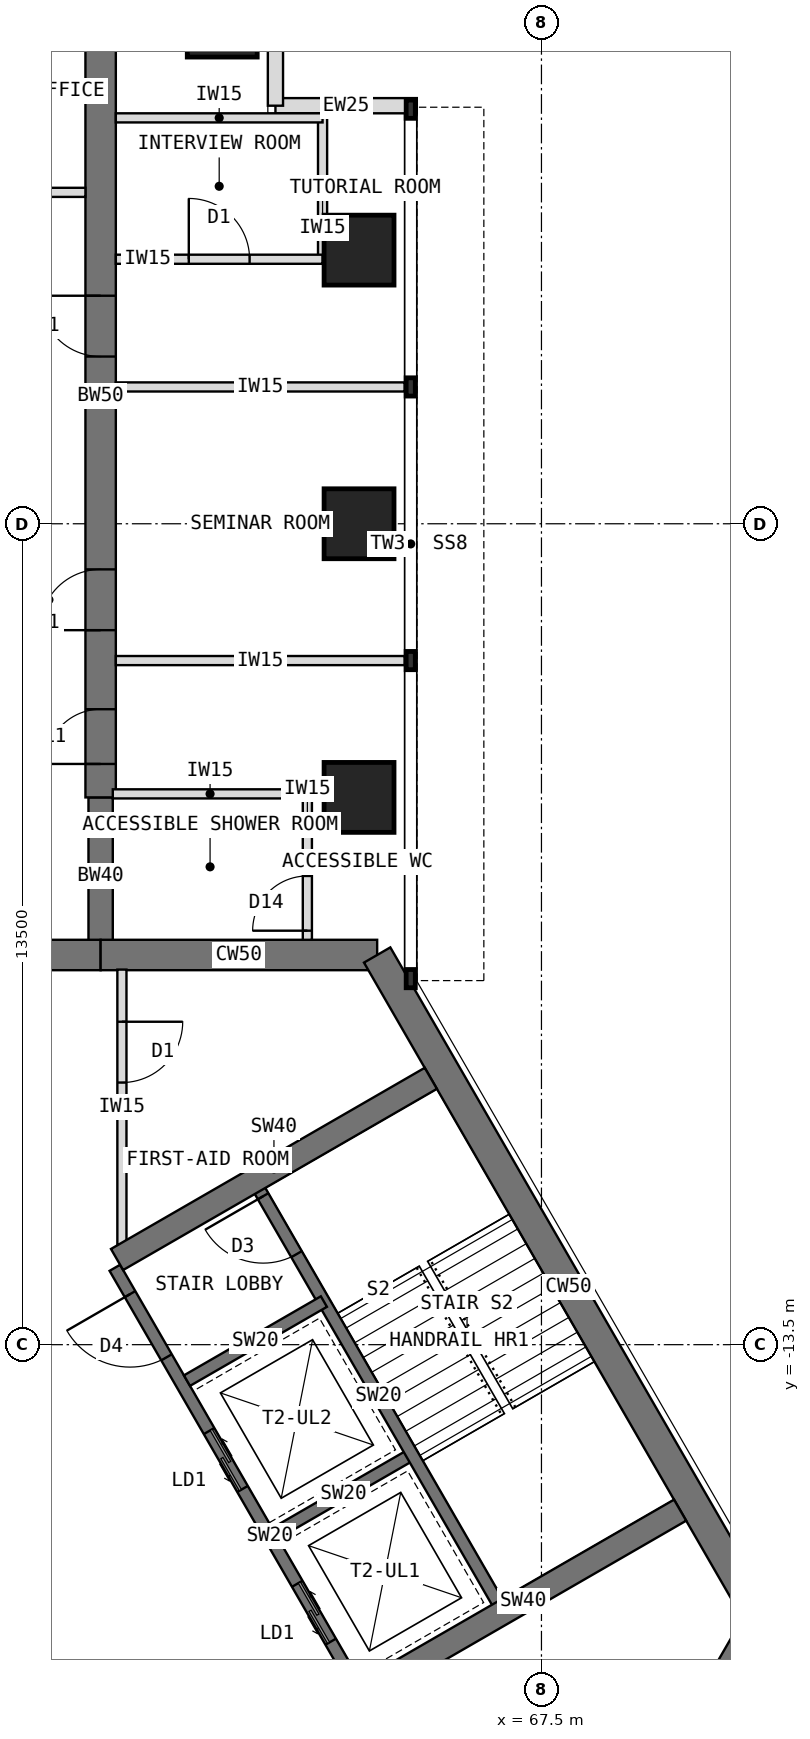
"""IFC4 building model, lengths in metres.
Left out: names, types, materials, properties, quantities, classifications, styles, units other than length and angle.
Written with IfcOpenShell. Run it as: python <this file> out.ifc"""

import sys

from ifc_helpers import new_model, si_unit, direction, frame, frame_2d, origin, origin_2d, place, context, subcontext, project, spatial, rectangle, extrude, element, fill, save


model = new_model("IFC4")
c1 = context("Model", 3, precision=1e-05, world=origin(), true_north=direction((0.0, 1.0)))
c2 = subcontext(c1, "Body", "Model", "MODEL_VIEW")
j1 = project(units=[si_unit("LENGTHUNIT", "METRE"), si_unit("PLANEANGLEUNIT", "RADIAN")], contexts=[c1])
p1 = place(None, origin())
s1 = spatial("IfcSite", under=j1, at=p1, CompositionType="ELEMENT")
p2 = place(p1, origin())
s2 = spatial("IfcBuilding", under=s1, at=p2, CompositionType="ELEMENT")
p3 = place(p2, frame((0.0, 0.0, 206.5)))
s3 = spatial("IfcBuildingStorey", under=s2, at=p3, CompositionType="ELEMENT", Elevation=206.5)
p4 = place(p3, frame((64.798, -7.092, 0.0), z_axis=(0.0, 0.0, 1.0), x_axis=(-1.0, 0.0, 0.0)))
e1 = element("IfcWall", 1, at=p4, inside=s3, PredefinedType="SHEAR", context=c2, shape_type="SweptSolid", body=[
    extrude(rectangle(XDim=4.548, YDim=0.5, at=frame_2d((2.274, 0.0))), origin(), (0.0, 0.0, 1.0), 4.0),
])
p5 = place(p3, frame((60.25, -7.092, 0.0), z_axis=(0.0, 0.0, 1.0), x_axis=(-1.0, 0.0, 0.0)))
e2 = element("IfcWall", 2, at=p5, inside=s3, PredefinedType="SHEAR", context=c2, shape_type="SweptSolid", body=[
    extrude(rectangle(XDim=3.5, YDim=0.5, at=frame_2d((1.75, 0.0))), origin(), (0.0, 0.0, 1.0), 4.0),
])
p6 = place(p5, frame((0.85, 0.0, 0.0)))
e3 = element("IfcOpeningElement", 3, at=p6, cuts=e2, PredefinedType="OPENING", context=c2, shape_type="SweptSolid", body=[
    extrude(rectangle(XDim=1.8, YDim=2.1, at=frame_2d((0.9, 1.05))), frame((0.0, 0.26, 0.0), z_axis=(0.0, -1.0, 0.0), x_axis=(1.0, 0.0, 0.0)), (0.0, 0.0, 1.0), 0.52),
])
p7 = place(p3, frame((68.822, -21.939, 0.0), z_axis=(0.0, 0.0, 1.0), x_axis=(0.500024481964, 0.866011268655, 0.0)))
e4 = element("IfcWall", 4, at=p7, inside=s3, PredefinedType="SHEAR", context=c2, shape_type="SweptSolid", body=[
    extrude(rectangle(XDim=4.548, YDim=0.5, at=frame_2d((2.274, 0.0))), origin(), (0.0, 0.0, 1.0), 4.0),
])
p8 = place(p3, frame((71.096, -18.0, 0.0), z_axis=(0.0, 0.0, 1.0), x_axis=(-0.500005998175, 0.866021940709, 0.0)))
e5 = element("IfcWall", 5, at=p8, inside=s3, PredefinedType="SHEAR", context=c2, shape_type="SweptSolid", body=[
    extrude(rectangle(XDim=12.596, YDim=0.5, at=frame_2d((6.298, 0.0))), origin(), (0.0, 0.0, 1.0), 4.0),
])
p9 = place(p3, frame((60.25, -7.092, 0.0), z_axis=(0.0, 0.0, 1.0), x_axis=(0.0, 1.0, 0.0)))
e6 = element("IfcWall", 6, at=p9, inside=s3, PredefinedType="SHEAR", context=c2, shape_type="SweptSolid", body=[
    extrude(rectangle(XDim=2.592, YDim=0.4, at=frame_2d((1.296, 0.0))), origin(), (0.0, 0.0, 1.0), 4.0),
])
p10 = place(p3, frame((60.25, -4.5, 0.0), z_axis=(0.0, 0.0, 1.0), x_axis=(0.0, 1.0, 0.0)))
e7 = element("IfcWall", 7, at=p10, inside=s3, PredefinedType="SHEAR", context=c2, shape_type="SweptSolid", body=[
    extrude(rectangle(XDim=13.2, YDim=0.5, at=frame_2d((6.6, 0.0))), origin(), (0.0, 0.0, 1.0), 4.0),
])
p11 = place(p10, frame((0.55, 0.0, 0.0)))
e8 = element("IfcOpeningElement", 8, at=p11, cuts=e7, PredefinedType="OPENING", context=c2, shape_type="SweptSolid", body=[
    extrude(rectangle(XDim=0.9, YDim=2.1, at=frame_2d((0.45, 1.05))), frame((0.0, 0.26, 0.0), z_axis=(0.0, -1.0, 0.0), x_axis=(1.0, 0.0, 0.0)), (0.0, 0.0, 1.0), 0.52),
])
p12 = place(p10, frame((2.75, 0.0, 0.0)))
e9 = element("IfcOpeningElement", 9, at=p12, cuts=e7, PredefinedType="OPENING", context=c2, shape_type="SweptSolid", body=[
    extrude(rectangle(XDim=1.0, YDim=2.1, at=frame_2d((0.5, 1.05))), frame((0.0, 0.26, 0.0), z_axis=(0.0, -1.0, 0.0), x_axis=(1.0, 0.0, 0.0)), (0.0, 0.0, 1.0), 0.52),
])
p13 = place(p10, frame((7.25, 0.0, 0.0)))
e10 = element("IfcOpeningElement", 10, at=p13, cuts=e7, PredefinedType="OPENING", context=c2, shape_type="SweptSolid", body=[
    extrude(rectangle(XDim=1.0, YDim=2.1, at=frame_2d((0.5, 1.05))), frame((0.0, 0.26, 0.0), z_axis=(0.0, -1.0, 0.0), x_axis=(1.0, 0.0, 0.0)), (0.0, 0.0, 1.0), 0.52),
])
for number, where, z_axis, x_axis in (
    (11, (64.5, -4.5, 0.0), (0.0, 0.0, 1.0), (1.0, 0.0, 0.0)),
    (12, (64.5, 0.0, 0.0), (0.0, 0.0, 1.0), (1.0, 0.0, 0.0)),
    (13, (64.5, 4.5, 0.0), (0.0, 0.0, 1.0), (1.0, 0.0, 0.0)),
    (14, (62.25, 8.25, 0.0), (0.0, 0.0, 1.0), (1.0, 0.0, 0.0)),
):
    element("IfcColumn", number, at=place(p3, frame(where, z_axis=z_axis, x_axis=x_axis)), inside=s3, PredefinedType="COLUMN", context=c2, shape_type="SweptSolid", body=[
        extrude(rectangle(XDim=1.15, YDim=1.15, at=origin_2d()), origin(), (0.0, 0.0, 1.0), 4.0),
    ])
for number, where, z_axis, x_axis in (
    (15, (65.45, 6.875, 0.0), (0.0, 0.0, 1.0), (-1.0, 0.0, 0.0)),
    (16, (63.125, 6.875, 0.0), (0.0, 0.0, 1.0), (0.0, 1.0, 0.0)),
):
    element("IfcWall", number, at=place(p3, frame(where, z_axis=z_axis, x_axis=x_axis)), inside=s3, PredefinedType="STANDARD", context=c2, shape_type="SweptSolid", body=[
        extrude(rectangle(XDim=2.325, YDim=0.25, at=frame_2d((1.163, 0.0))), origin(), (0.0, 0.0, 1.0), 3.8),
    ])
p14 = place(p3, frame((64.484, -19.164, 0.0), z_axis=(0.0, 0.0, 1.0), x_axis=(-0.49999894854, 0.866026010844, 0.0)))
e17 = element("IfcWall", 17, at=p14, inside=s3, PredefinedType="SHEAR", context=c2, shape_type="SweptSolid", body=[
    extrude(rectangle(XDim=8.0, YDim=0.2, at=frame_2d((4.0, 0.0))), origin(), (0.0, 0.0, 1.0), 4.0),
])
p15 = place(p14, frame((6.3, 0.0, 0.0)))
e18 = element("IfcOpeningElement", 18, at=p15, cuts=e17, PredefinedType="OPENING", context=c2, shape_type="SweptSolid", body=[
    extrude(rectangle(XDim=1.2, YDim=2.1, at=frame_2d((0.6, 1.05))), frame((0.0, 0.11, 0.0), z_axis=(0.0, -1.0, 0.0), x_axis=(1.0, 0.0, 0.0)), (0.0, 0.0, 1.0), 0.22),
])
p16 = place(p14, frame((0.9, 0.0, 0.0)))
e19 = element("IfcOpeningElement", 19, at=p16, cuts=e17, PredefinedType="OPENING", context=c2, shape_type="SweptSolid", body=[
    extrude(rectangle(XDim=1.1, YDim=2.2, at=frame_2d((0.55, 1.1))), frame((0.0, 0.11, 0.0), z_axis=(0.0, -1.0, 0.0), x_axis=(1.0, 0.0, 0.0)), (0.0, 0.0, 1.0), 0.22),
])
p17 = place(p14, frame((3.8, 0.0, 0.0)))
e20 = element("IfcOpeningElement", 20, at=p17, cuts=e17, PredefinedType="OPENING", context=c2, shape_type="SweptSolid", body=[
    extrude(rectangle(XDim=1.1, YDim=2.2, at=frame_2d((0.55, 1.1))), frame((0.0, 0.11, 0.0), z_axis=(0.0, -1.0, 0.0), x_axis=(1.0, 0.0, 0.0)), (0.0, 0.0, 1.0), 0.22),
])
p18 = place(p3, frame((63.12, -16.603, 0.0), z_axis=(0.0, 0.0, 1.0), x_axis=(0.866062058628, 0.499936506574, 0.0)))
e21 = element("IfcWall", 21, at=p18, inside=s3, PredefinedType="SHEAR", context=c2, shape_type="SweptSolid", body=[
    extrude(rectangle(XDim=2.6, YDim=0.2, at=frame_2d((1.3, 0.0))), origin(), (0.0, 0.0, 1.0), 4.0),
])
p19 = place(p3, frame((61.67, -14.091, 0.0), z_axis=(0.0, 0.0, 1.0), x_axis=(0.86603858612, 0.49997716683, 0.0)))
e22 = element("IfcWall", 22, at=p19, inside=s3, PredefinedType="SHEAR", context=c2, shape_type="SweptSolid", body=[
    extrude(rectangle(XDim=2.6, YDim=0.2, at=frame_2d((1.3, 0.0))), origin(), (0.0, 0.0, 1.0), 4.0),
])
p20 = place(p3, frame((66.822, -17.814, 0.0), z_axis=(0.0, 0.0, 1.0), x_axis=(-0.49999894854, 0.866026010844, 0.0)))
e23 = element("IfcWall", 23, at=p20, inside=s3, PredefinedType="SHEAR", context=c2, shape_type="SweptSolid", body=[
    extrude(rectangle(XDim=8.0, YDim=0.2, at=frame_2d((4.0, 0.0))), origin(), (0.0, 0.0, 1.0), 4.0),
])
p21 = place(p20, frame((6.7, 0.0, 0.0)))
e24 = element("IfcOpeningElement", 24, at=p21, cuts=e23, PredefinedType="OPENING", context=c2, shape_type="SweptSolid", body=[
    extrude(rectangle(XDim=1.1, YDim=2.1, at=frame_2d((0.55, 1.05))), frame((0.0, 0.11, 0.0), z_axis=(0.0, -1.0, 0.0), x_axis=(1.0, 0.0, 0.0)), (0.0, 0.0, 1.0), 0.22),
])
p22 = place(p3, frame((60.52, -12.099, 0.0), z_axis=(0.0, 0.0, 1.0), x_axis=(0.86602319114, 0.500003832394, 0.0)))
e25 = element("IfcWall", 25, at=p22, inside=s3, PredefinedType="SHEAR", context=c2, shape_type="SweptSolid", body=[
    extrude(rectangle(XDim=5.958, YDim=0.4, at=frame_2d((2.979, 0.0))), origin(), (0.0, 0.0, 1.0), 4.0),
])
p23 = place(p3, frame((64.62, -19.201, 0.0), z_axis=(0.0, 0.0, 1.0), x_axis=(0.866012946976, 0.500021575205, 0.0)))
e26 = element("IfcWall", 26, at=p23, inside=s3, PredefinedType="SHEAR", context=c2, shape_type="SweptSolid", body=[
    extrude(rectangle(XDim=5.958, YDim=0.4, at=frame_2d((2.979, 0.0))), origin(), (0.0, 0.0, 1.0), 4.0),
])
for number, where, z_axis, x_axis in (
    (27, (60.5, -2.25, 0.0), (0.0, 0.0, 1.0), (1.0, 0.0, 0.0)),
    (28, (60.5, 2.25, 0.0), (0.0, 0.0, 1.0), (1.0, 0.0, 0.0)),
):
    element("IfcWall", number, at=place(p3, frame(where, z_axis=z_axis, x_axis=x_axis)), inside=s3, PredefinedType="PARTITIONING", context=c2, shape_type="SweptSolid", body=[
        extrude(rectangle(XDim=4.75, YDim=0.15, at=frame_2d((2.375, 0.0))), origin(), (0.0, 0.0, 1.0), 3.8),
    ])
p24 = place(p3, frame((63.9, 4.35, 0.0), z_axis=(0.0, 0.0, 1.0), x_axis=(0.0, 1.0, 0.0)))
e29 = element("IfcWall", 29, at=p24, inside=s3, PredefinedType="PARTITIONING", context=c2, shape_type="SweptSolid", body=[
    extrude(rectangle(XDim=2.4, YDim=0.15, at=frame_2d((1.2, 0.0))), origin(), (0.0, 0.0, 1.0), 3.8),
])
p25 = place(p3, frame((60.5, 4.35, 0.0), z_axis=(0.0, 0.0, 1.0), x_axis=(1.0, 0.0, 0.0)))
e30 = element("IfcWall", 30, at=p25, inside=s3, PredefinedType="PARTITIONING", context=c2, shape_type="SweptSolid", body=[
    extrude(rectangle(XDim=3.4, YDim=0.15, at=frame_2d((1.7, 0.0))), origin(), (0.0, 0.0, 1.0), 3.8),
])
p26 = place(p25, frame((1.2, 0.0, 0.0)))
e31 = element("IfcOpeningElement", 31, at=p26, cuts=e30, PredefinedType="OPENING", context=c2, shape_type="SweptSolid", body=[
    extrude(rectangle(XDim=1.0, YDim=2.1, at=frame_2d((0.5, 1.05))), frame((0.0, 0.085, 0.0), z_axis=(0.0, -1.0, 0.0), x_axis=(1.0, 0.0, 0.0)), (0.0, 0.0, 1.0), 0.17),
])
p27 = place(p3, frame((60.5, 6.675, 0.0), z_axis=(0.0, 0.0, 1.0), x_axis=(1.0, 0.0, 0.0)))
e32 = element("IfcWall", 32, at=p27, inside=s3, PredefinedType="PARTITIONING", context=c2, shape_type="SweptSolid", body=[
    extrude(rectangle(XDim=3.4, YDim=0.15, at=frame_2d((1.7, 0.0))), origin(), (0.0, 0.0, 1.0), 3.8),
])
p28 = place(p3, frame((63.65, -6.842, 0.0), z_axis=(0.0, 0.0, 1.0), x_axis=(0.0, 1.0, 0.0)))
e33 = element("IfcWall", 33, at=p28, inside=s3, PredefinedType="PARTITIONING", context=c2, shape_type="SweptSolid", body=[
    extrude(rectangle(XDim=2.4, YDim=0.15, at=frame_2d((1.2, 0.0))), origin(), (0.0, 0.0, 1.0), 3.8),
])
p29 = place(p28, frame((0.15, 0.0, 0.0)))
e34 = element("IfcOpeningElement", 34, at=p29, cuts=e33, PredefinedType="OPENING", context=c2, shape_type="SweptSolid", body=[
    extrude(rectangle(XDim=0.9, YDim=2.1, at=frame_2d((0.45, 1.05))), frame((0.0, 0.085, 0.0), z_axis=(0.0, -1.0, 0.0), x_axis=(1.0, 0.0, 0.0)), (0.0, 0.0, 1.0), 0.17),
])
p30 = place(p3, frame((60.45, -4.442, 0.0), z_axis=(0.0, 0.0, 1.0), x_axis=(1.0, 0.0, 0.0)))
e35 = element("IfcWall", 35, at=p30, inside=s3, PredefinedType="PARTITIONING", context=c2, shape_type="SweptSolid", body=[
    extrude(rectangle(XDim=3.2, YDim=0.15, at=frame_2d((1.6, 0.0))), origin(), (0.0, 0.0, 1.0), 3.267),
])
p31 = place(p3, frame((60.6, -7.332, 0.0), z_axis=(0.0, 0.0, 1.0), x_axis=(0.0, -1.0, 0.0)))
e36 = element("IfcWall", 36, at=p31, inside=s3, PredefinedType="PARTITIONING", context=c2, shape_type="SweptSolid", body=[
    extrude(rectangle(XDim=4.526, YDim=0.15, at=frame_2d((2.263, 0.0))), origin(), (0.0, 0.0, 1.0), 3.8),
])
p32 = place(p31, frame((0.858, 0.0, 0.0)))
e37 = element("IfcOpeningElement", 37, at=p32, cuts=e36, PredefinedType="OPENING", context=c2, shape_type="SweptSolid", body=[
    extrude(rectangle(XDim=1.0, YDim=2.1, at=frame_2d((0.5, 1.05))), frame((0.0, 0.085, 0.0), z_axis=(0.0, -1.0, 0.0), x_axis=(1.0, 0.0, 0.0)), (0.0, 0.0, 1.0), 0.17),
])
p33 = place(p3, frame((60.0, 5.45, 0.0), z_axis=(0.0, 0.0, 1.0), x_axis=(-1.0, 0.0, 0.0)))
e38 = element("IfcWall", 38, at=p33, inside=s3, PredefinedType="PARTITIONING", context=c2, shape_type="SweptSolid", body=[
    extrude(rectangle(XDim=3.0, YDim=0.15, at=frame_2d((1.5, 0.0))), origin(), (0.0, 0.0, 1.0), 3.8),
])
p34 = place(p33, frame((1.0, 0.0, 0.0)))
e39 = element("IfcOpeningElement", 39, at=p34, cuts=e38, PredefinedType="OPENING", context=c2, shape_type="SweptSolid", body=[
    extrude(rectangle(XDim=1.0, YDim=2.1, at=frame_2d((0.5, 1.05))), frame((0.0, 0.085, 0.0), z_axis=(0.0, -1.0, 0.0), x_axis=(1.0, 0.0, 0.0)), (0.0, 0.0, 1.0), 0.17),
])
p35 = place(p15, origin())
e40 = element("IfcDoor", 40, at=p35, inside=s3, OperationType="SINGLE_SWING_RIGHT", PredefinedType="DOOR", context=c2, shape_type="SweptSolid", body=[
    extrude(rectangle(XDim=1.2, YDim=2.1, at=frame_2d((0.6, 1.05))), frame((0.0, 0.025, 0.0), z_axis=(0.0, -1.0, 0.0), x_axis=(1.0, 0.0, 0.0)), (0.0, 0.0, 1.0), 0.05),
])
fill(e18, e40)
p36 = place(p16, origin())
e41 = element("IfcDoor", 41, at=p36, inside=s3, OperationType="DOUBLE_DOOR_SLIDING", PredefinedType="DOOR", context=c2, shape_type="SweptSolid", body=[
    extrude(rectangle(XDim=1.1, YDim=2.2, at=frame_2d((0.55, 1.1))), frame((0.0, 0.025, 0.0), z_axis=(0.0, -1.0, 0.0), x_axis=(1.0, 0.0, 0.0)), (0.0, 0.0, 1.0), 0.05),
])
fill(e19, e41)
p37 = place(p17, origin())
e42 = element("IfcDoor", 42, at=p37, inside=s3, OperationType="DOUBLE_DOOR_SLIDING", PredefinedType="DOOR", context=c2, shape_type="SweptSolid", body=[
    extrude(rectangle(XDim=1.1, YDim=2.2, at=frame_2d((0.55, 1.1))), frame((0.0, 0.025, 0.0), z_axis=(0.0, -1.0, 0.0), x_axis=(1.0, 0.0, 0.0)), (0.0, 0.0, 1.0), 0.05),
])
fill(e20, e42)
p38 = place(p21, origin())
e43 = element("IfcDoor", 43, at=p38, inside=s3, OperationType="SINGLE_SWING_RIGHT", PredefinedType="DOOR", context=c2, shape_type="SweptSolid", body=[
    extrude(rectangle(XDim=1.1, YDim=2.1, at=frame_2d((0.55, 1.05))), frame((0.0, 0.025, 0.0), z_axis=(0.0, -1.0, 0.0), x_axis=(1.0, 0.0, 0.0)), (0.0, 0.0, 1.0), 0.05),
])
fill(e24, e43)
p39 = place(p26, origin())
e44 = element("IfcDoor", 44, at=p39, inside=s3, OperationType="SINGLE_SWING_LEFT", PredefinedType="DOOR", context=c2, shape_type="SweptSolid", body=[
    extrude(rectangle(XDim=1.0, YDim=2.1, at=frame_2d((0.5, 1.05))), frame((0.0, 0.025, 0.0), z_axis=(0.0, -1.0, 0.0), x_axis=(1.0, 0.0, 0.0)), (0.0, 0.0, 1.0), 0.05),
])
fill(e31, e44)
p40 = place(p29, origin())
e45 = element("IfcDoor", 45, at=p40, inside=s3, OperationType="SINGLE_SWING_LEFT", PredefinedType="DOOR", context=c2, shape_type="SweptSolid", body=[
    extrude(rectangle(XDim=0.9, YDim=2.1, at=frame_2d((0.45, 1.05))), frame((0.0, 0.025, 0.0), z_axis=(0.0, -1.0, 0.0), x_axis=(1.0, 0.0, 0.0)), (0.0, 0.0, 1.0), 0.05),
])
fill(e34, e45)
p41 = place(p32, origin())
e46 = element("IfcDoor", 46, at=p41, inside=s3, OperationType="SINGLE_SWING_LEFT", PredefinedType="DOOR", context=c2, shape_type="SweptSolid", body=[
    extrude(rectangle(XDim=1.0, YDim=2.1, at=frame_2d((0.5, 1.05))), frame((0.0, 0.025, 0.0), z_axis=(0.0, -1.0, 0.0), x_axis=(1.0, 0.0, 0.0)), (0.0, 0.0, 1.0), 0.05),
])
fill(e37, e46)
p42 = place(p11, origin())
e47 = element("IfcDoor", 47, at=p42, inside=s3, OperationType="SINGLE_SWING_LEFT", PredefinedType="DOOR", context=c2, shape_type="SweptSolid", body=[
    extrude(rectangle(XDim=0.9, YDim=2.1, at=frame_2d((0.45, 1.05))), frame((0.0, 0.025, 0.0), z_axis=(0.0, -1.0, 0.0), x_axis=(1.0, 0.0, 0.0)), (0.0, 0.0, 1.0), 0.05),
])
fill(e8, e47)
p43 = place(p12, origin())
e48 = element("IfcDoor", 48, at=p43, inside=s3, OperationType="SINGLE_SWING_LEFT", PredefinedType="DOOR", context=c2, shape_type="SweptSolid", body=[
    extrude(rectangle(XDim=1.0, YDim=2.1, at=frame_2d((0.5, 1.05))), frame((0.0, 0.025, 0.0), z_axis=(0.0, -1.0, 0.0), x_axis=(1.0, 0.0, 0.0)), (0.0, 0.0, 1.0), 0.05),
])
fill(e9, e48)
p44 = place(p13, origin())
e49 = element("IfcDoor", 49, at=p44, inside=s3, OperationType="SINGLE_SWING_RIGHT", PredefinedType="DOOR", context=c2, shape_type="SweptSolid", body=[
    extrude(rectangle(XDim=1.0, YDim=2.1, at=frame_2d((0.5, 1.05))), frame((0.0, 0.025, 0.0), z_axis=(0.0, -1.0, 0.0), x_axis=(1.0, 0.0, 0.0)), (0.0, 0.0, 1.0), 0.05),
])
fill(e10, e49)
save(model, sys.argv[1])
